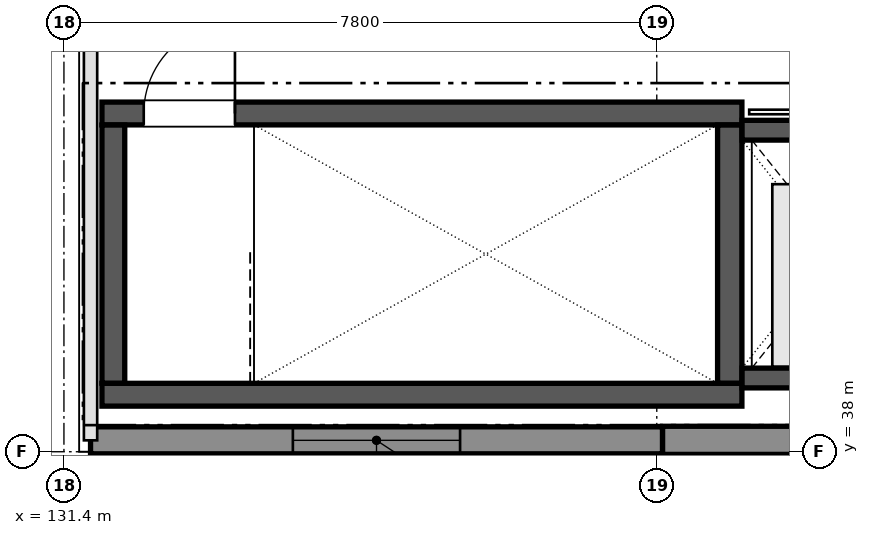
"""IFC4 building model, lengths in metres.
Left out: names, types, materials, properties, quantities, classifications, styles, units other than length and angle.
Written with IfcOpenShell. Run it as: python <this file> out.ifc"""

import sys

from ifc_helpers import new_model, si_unit, direction, frame, frame_2d, origin, place, context, subcontext, project, spatial, rectangle, extrude, element, fill, save


model = new_model("IFC4")
c1 = context("Model", 3, precision=1e-05, world=origin(), true_north=direction((0.0, 1.0)))
c2 = subcontext(c1, "Body", "Model", "MODEL_VIEW")
j1 = project(units=[si_unit("LENGTHUNIT", "METRE"), si_unit("PLANEANGLEUNIT", "RADIAN")], contexts=[c1])
p1 = place(None, origin())
s1 = spatial("IfcSite", under=j1, at=p1, CompositionType="ELEMENT")
p2 = place(p1, origin())
s2 = spatial("IfcBuilding", under=s1, at=p2, CompositionType="ELEMENT")
p3 = place(p2, frame((0.0, 0.0, 5.1)))
s3 = spatial("IfcBuildingStorey", under=s2, at=p3, CompositionType="ELEMENT", Elevation=5.1)
p4 = place(p3, frame((146.8, 38.15, 0.0), z_axis=(0.0, 0.0, 1.0), x_axis=(-1.0, 0.0, 0.0)))
e1 = element("IfcWall", 1, at=p4, inside=s3, PredefinedType="SOLIDWALL", context=c2, shape_type="SweptSolid", body=[
    extrude(rectangle(XDim=7.525, YDim=0.37, at=frame_2d((3.763, 0.0))), origin(), (0.0, 0.0, 1.0), 4.205),
])
p5 = place(p4, frame((2.763, 0.0, 0.9)))
e2 = element("IfcOpeningElement", 2, at=p5, cuts=e1, PredefinedType="OPENING", context=c2, shape_type="SweptSolid", body=[
    extrude(rectangle(XDim=2.0, YDim=1.75, at=frame_2d((1.0, 0.875))), frame((0.0, 0.195, 0.0), z_axis=(0.0, -1.0, 0.0), x_axis=(1.0, 0.0, 0.0)), (0.0, 0.0, 1.0), 0.39),
])
p6 = place(p3, frame((139.275, 38.15, 0.0), z_axis=(0.0, 0.0, 1.0), x_axis=(-1.0, 0.0, 0.0)))
e3 = element("IfcWall", 3, at=p6, inside=s3, PredefinedType="SOLIDWALL", context=c2, shape_type="SweptSolid", body=[
    extrude(rectangle(XDim=7.525, YDim=0.355, at=frame_2d((3.762, 0.0))), origin(), (0.0, 0.0, 1.0), 4.205),
])
p7 = place(p6, frame((2.663, 0.0, 0.9)))
e4 = element("IfcOpeningElement", 4, at=p7, cuts=e3, PredefinedType="OPENING", context=c2, shape_type="SweptSolid", body=[
    extrude(rectangle(XDim=2.2, YDim=1.75, at=frame_2d((1.1, 0.875))), frame((0.0, 0.188, 0.0), z_axis=(0.0, -1.0, 0.0), x_axis=(1.0, 0.0, 0.0)), (0.0, 0.0, 1.0), 0.375),
])
p8 = place(p3, frame((131.9, 38.75, 0.0), z_axis=(0.0, 0.0, 1.0), x_axis=(1.0, 0.0, 0.0)))
e5 = element("IfcWall", 5, at=p8, inside=s3, PredefinedType="SHEAR", context=c2, shape_type="SweptSolid", body=[
    extrude(rectangle(XDim=8.42, YDim=0.3, at=frame_2d((4.21, 0.0))), origin(), (0.0, 0.0, 1.0), 4.205),
])
p9 = place(p3, frame((131.9, 42.45, 0.0), z_axis=(0.0, 0.0, 1.0), x_axis=(1.0, 0.0, 0.0)))
e6 = element("IfcWall", 6, at=p9, inside=s3, PredefinedType="SHEAR", context=c2, shape_type="SweptSolid", body=[
    extrude(rectangle(XDim=8.42, YDim=0.3, at=frame_2d((4.21, 0.0))), origin(), (0.0, 0.0, 1.0), 4.205),
])
p10 = place(p9, frame((0.55, 0.0, 0.0)))
e7 = element("IfcOpeningElement", 7, at=p10, cuts=e6, PredefinedType="OPENING", context=c2, shape_type="SweptSolid", body=[
    extrude(rectangle(XDim=1.2, YDim=2.2, at=frame_2d((0.6, 1.1))), frame((0.0, 0.16, 0.0), z_axis=(0.0, -1.0, 0.0), x_axis=(1.0, 0.0, 0.0)), (0.0, 0.0, 1.0), 0.32),
])
p11 = place(p3, frame((132.05, 38.902, 0.0), z_axis=(0.0, 0.0, 1.0), x_axis=(0.0, 1.0, 0.0)))
e8 = element("IfcWall", 8, at=p11, inside=s3, PredefinedType="SHEAR", context=c2, shape_type="SweptSolid", body=[
    extrude(rectangle(XDim=3.396, YDim=0.3, at=frame_2d((1.698, 0.0))), origin(), (0.0, 0.0, 1.0), 4.205),
])
p12 = place(p3, frame((140.16, 38.902, 0.0), z_axis=(0.0, 0.0, 1.0), x_axis=(0.0, 1.0, 0.0)))
e9 = element("IfcWall", 9, at=p12, inside=s3, PredefinedType="SHEAR", context=c2, shape_type="SweptSolid", body=[
    extrude(rectangle(XDim=3.396, YDim=0.32, at=frame_2d((1.698, 0.0))), origin(), (0.0, 0.0, 1.0), 4.205),
])
p13 = place(p3, frame((140.322, 38.97, 0.0), z_axis=(0.0, 0.0, 1.0), x_axis=(1.0, 0.0, 0.0)))
e10 = element("IfcWall", 10, at=p13, inside=s3, PredefinedType="SHEAR", context=c2, shape_type="SweptSolid", body=[
    extrude(rectangle(XDim=2.658, YDim=0.26, at=frame_2d((1.329, 0.0))), origin(), (0.0, 0.0, 1.0), 4.205),
])
p14 = place(p3, frame((140.322, 42.23, 0.0), z_axis=(0.0, 0.0, 1.0), x_axis=(1.0, 0.0, 0.0)))
e11 = element("IfcWall", 11, at=p14, inside=s3, PredefinedType="SHEAR", context=c2, shape_type="SweptSolid", body=[
    extrude(rectangle(XDim=2.658, YDim=0.26, at=frame_2d((1.329, 0.0))), origin(), (0.0, 0.0, 1.0), 4.205),
])
p15 = place(p14, frame((0.679, 0.0, 0.0)))
e12 = element("IfcOpeningElement", 12, at=p15, cuts=e11, PredefinedType="OPENING", context=c2, shape_type="SweptSolid", body=[
    extrude(rectangle(XDim=1.3, YDim=2.2, at=frame_2d((0.65, 1.1))), frame((0.0, 0.14, 0.0), z_axis=(0.0, -1.0, 0.0), x_axis=(1.0, 0.0, 0.0)), (0.0, 0.0, 1.0), 0.28),
])
p16 = place(p7, origin())
e13 = element("IfcWindow", 13, at=p16, inside=s3, PartitioningType="SINGLE_PANEL", PredefinedType="WINDOW", context=c2, shape_type="SweptSolid", body=[
    extrude(rectangle(XDim=2.2, YDim=1.75, at=frame_2d((1.1, 0.875))), frame((0.0, 0.03, 0.0), z_axis=(0.0, -1.0, 0.0), x_axis=(1.0, 0.0, 0.0)), (0.0, 0.0, 1.0), 0.06),
])
fill(e4, e13)
p17 = place(p10, origin())
e14 = element("IfcDoor", 14, at=p17, inside=s3, OperationType="SINGLE_SWING_RIGHT", PredefinedType="DOOR", context=c2, shape_type="SweptSolid", body=[
    extrude(rectangle(XDim=1.2, YDim=2.2, at=frame_2d((0.6, 1.1))), frame((0.0, 0.025, 0.0), z_axis=(0.0, -1.0, 0.0), x_axis=(1.0, 0.0, 0.0)), (0.0, 0.0, 1.0), 0.05),
])
fill(e7, e14)
save(model, sys.argv[1])
